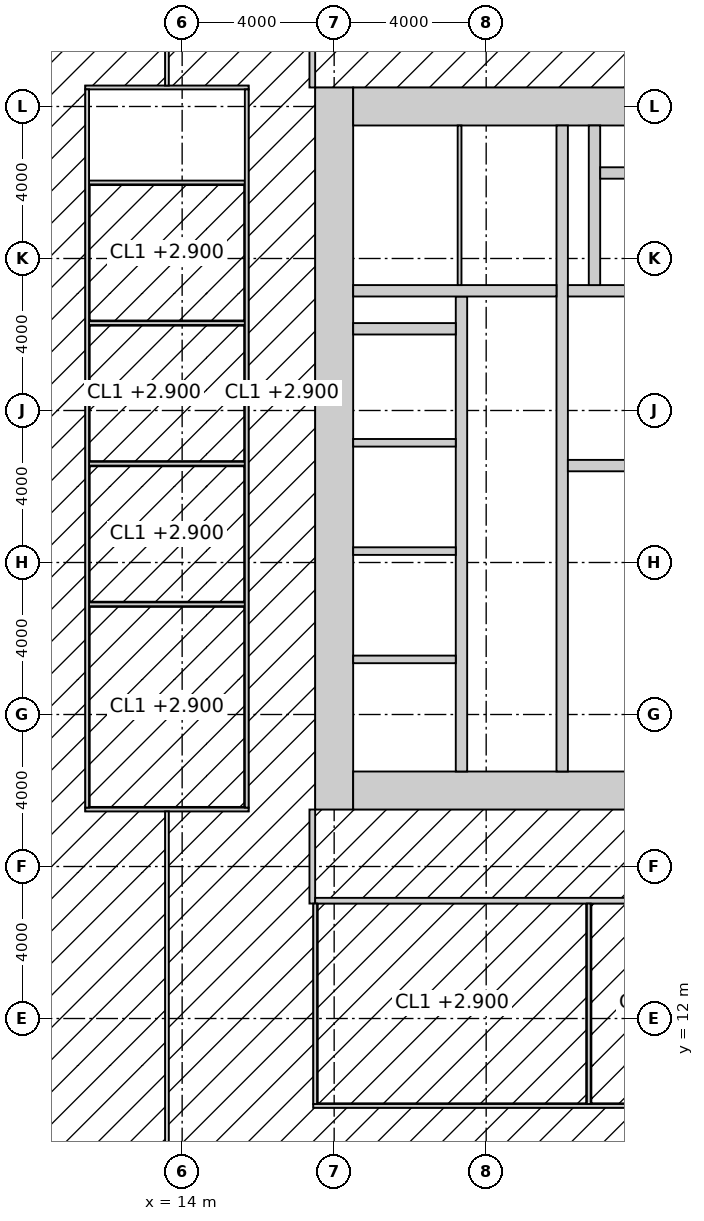
"""IFC4 building model, lengths in metres.
Left out: names, types, materials, properties, quantities, classifications, styles, units other than length and angle.
Written with IfcOpenShell. Run it as: python <this file> out.ifc"""

import sys

from ifc_helpers import new_model, si_unit, direction, frame, frame_2d, origin, place, context, subcontext, project, spatial, rectangle, extrude, element, fill, save


model = new_model("IFC4")
c1 = context("Model", 3, precision=1e-05, world=origin(), true_north=direction((0.0, 1.0)))
c2 = subcontext(c1, "Body", "Model", "MODEL_VIEW")
j1 = project(units=[si_unit("LENGTHUNIT", "METRE"), si_unit("PLANEANGLEUNIT", "RADIAN")], contexts=[c1])
p1 = place(None, origin())
s1 = spatial("IfcSite", under=j1, at=p1, CompositionType="ELEMENT")
p2 = place(p1, origin())
s2 = spatial("IfcBuilding", under=s1, at=p2, CompositionType="ELEMENT")
p3 = place(p2, frame((0.0, 0.0, 159.8)))
s3 = spatial("IfcBuildingStorey", under=s2, at=p3, CompositionType="ELEMENT", Elevation=159.8)
p4 = place(p3, frame((18.0, 17.5, -0.15), z_axis=(0.0, 0.0, 1.0), x_axis=(0.0, 1.0, 0.0)))
e1 = element("IfcWall", 1, at=p4, inside=s3, PredefinedType="SHEAR", context=c2, shape_type="SweptSolid", body=[
    extrude(rectangle(XDim=19.0, YDim=1.0, at=frame_2d((9.5, 0.0))), origin(), (0.0, 0.0, 1.0), 4.0),
])
p5 = place(p3, frame((18.5, 18.0, -0.15), z_axis=(0.0, 0.0, 1.0), x_axis=(1.0, 0.0, 0.0)))
e2 = element("IfcWall", 2, at=p5, inside=s3, PredefinedType="SHEAR", context=c2, shape_type="SweptSolid", body=[
    extrude(rectangle(XDim=17.6, YDim=1.0, at=frame_2d((8.8, 0.0))), origin(), (0.0, 0.0, 1.0), 4.0),
])
p6 = place(p5, frame((3.45, 0.0, 0.15)))
e3 = element("IfcOpeningElement", 3, at=p6, cuts=e2, PredefinedType="OPENING", context=c2, shape_type="SweptSolid", body=[
    extrude(rectangle(XDim=1.5, YDim=2.4, at=frame_2d((0.75, 1.2))), frame((0.0, 0.51, 0.0), z_axis=(0.0, -1.0, 0.0), x_axis=(1.0, 0.0, 0.0)), (0.0, 0.0, 1.0), 1.02),
])
p7 = place(p3, frame((18.5, 36.0, -0.15), z_axis=(0.0, 0.0, 1.0), x_axis=(1.0, 0.0, 0.0)))
e4 = element("IfcWall", 4, at=p7, inside=s3, PredefinedType="SHEAR", context=c2, shape_type="SweptSolid", body=[
    extrude(rectangle(XDim=17.6, YDim=1.0, at=frame_2d((8.8, 0.0))), origin(), (0.0, 0.0, 1.0), 4.0),
])
p8 = place(p3, frame((24.0, 18.5, -0.15), z_axis=(0.0, 0.0, 1.0), x_axis=(0.0, 1.0, 0.0)))
e5 = element("IfcWall", 5, at=p8, inside=s3, PredefinedType="SHEAR", context=c2, shape_type="SweptSolid", body=[
    extrude(rectangle(XDim=17.0, YDim=0.3, at=frame_2d((8.5, 0.0))), origin(), (0.0, 0.0, 1.0), 4.0),
])
p9 = place(p8, frame((9.6, 0.0, 0.15)))
e6 = element("IfcOpeningElement", 6, at=p9, cuts=e5, PredefinedType="OPENING", context=c2, shape_type="SweptSolid", body=[
    extrude(rectangle(XDim=1.5, YDim=2.4, at=frame_2d((0.75, 1.2))), frame((0.0, 0.16, 0.0), z_axis=(0.0, -1.0, 0.0), x_axis=(1.0, 0.0, 0.0)), (0.0, 0.0, 1.0), 0.32),
])
p10 = place(p3, frame((24.15, 26.55, -0.15), z_axis=(0.0, 0.0, 1.0), x_axis=(1.0, 0.0, 0.0)))
e7 = element("IfcWall", 7, at=p10, inside=s3, PredefinedType="SHEAR", context=c2, shape_type="SweptSolid", body=[
    extrude(rectangle(XDim=11.25, YDim=0.3, at=frame_2d((5.625, 0.0))), origin(), (0.0, 0.0, 1.0), 4.0),
])
p11 = place(p10, frame((9.25, 0.0, 0.15)))
e8 = element("IfcOpeningElement", 8, at=p11, cuts=e7, PredefinedType="OPENING", context=c2, shape_type="SweptSolid", body=[
    extrude(rectangle(XDim=1.0, YDim=2.2, at=frame_2d((0.5, 1.1))), frame((0.0, 0.16, 0.0), z_axis=(0.0, -1.0, 0.0), x_axis=(1.0, 0.0, 0.0)), (0.0, 0.0, 1.0), 0.32),
])
p12 = place(p10, frame((4.9, 0.0, 0.15)))
e9 = element("IfcOpeningElement", 9, at=p12, cuts=e7, PredefinedType="OPENING", context=c2, shape_type="SweptSolid", body=[
    extrude(rectangle(XDim=1.5, YDim=2.4, at=frame_2d((0.75, 1.2))), frame((0.0, 0.16, 0.0), z_axis=(0.0, -1.0, 0.0), x_axis=(1.0, 0.0, 0.0)), (0.0, 0.0, 1.0), 0.32),
])
p13 = place(p3, frame((24.15, 31.15, -0.15), z_axis=(0.0, 0.0, 1.0), x_axis=(1.0, 0.0, 0.0)))
e10 = element("IfcWall", 10, at=p13, inside=s3, PredefinedType="SHEAR", context=c2, shape_type="SweptSolid", body=[
    extrude(rectangle(XDim=11.25, YDim=0.3, at=frame_2d((5.625, 0.0))), origin(), (0.0, 0.0, 1.0), 4.0),
])
p14 = place(p13, frame((7.25, 0.0, 0.15)))
e11 = element("IfcOpeningElement", 11, at=p14, cuts=e10, PredefinedType="OPENING", context=c2, shape_type="SweptSolid", body=[
    extrude(rectangle(XDim=1.4, YDim=2.4, at=frame_2d((0.7, 1.2))), frame((0.0, 0.16, 0.0), z_axis=(0.0, -1.0, 0.0), x_axis=(1.0, 0.0, 0.0)), (0.0, 0.0, 1.0), 0.32),
])
p15 = place(p3, frame((21.35, 18.5, -0.15), z_axis=(0.0, 0.0, 1.0), x_axis=(0.0, 1.0, 0.0)))
e12 = element("IfcWall", 12, at=p15, inside=s3, PredefinedType="SHEAR", context=c2, shape_type="SweptSolid", body=[
    extrude(rectangle(XDim=12.5, YDim=0.3, at=frame_2d((6.25, 0.0))), origin(), (0.0, 0.0, 1.0), 4.0),
])
p16 = place(p15, frame((0.875, 0.0, 0.15)))
e13 = element("IfcOpeningElement", 13, at=p16, cuts=e12, PredefinedType="OPENING", context=c2, shape_type="SweptSolid", body=[
    extrude(rectangle(XDim=1.1, YDim=2.2, at=frame_2d((0.55, 1.1))), frame((0.0, 0.16, 0.0), z_axis=(0.0, -1.0, 0.0), x_axis=(1.0, 0.0, 0.0)), (0.0, 0.0, 1.0), 0.32),
])
p17 = place(p15, frame((3.825, 0.0, 0.15)))
e14 = element("IfcOpeningElement", 14, at=p17, cuts=e12, PredefinedType="OPENING", context=c2, shape_type="SweptSolid", body=[
    extrude(rectangle(XDim=1.1, YDim=2.2, at=frame_2d((0.55, 1.1))), frame((0.0, 0.16, 0.0), z_axis=(0.0, -1.0, 0.0), x_axis=(1.0, 0.0, 0.0)), (0.0, 0.0, 1.0), 0.32),
])
p18 = place(p15, frame((6.675, 0.0, 0.15)))
e15 = element("IfcOpeningElement", 15, at=p18, cuts=e12, PredefinedType="OPENING", context=c2, shape_type="SweptSolid", body=[
    extrude(rectangle(XDim=1.1, YDim=2.2, at=frame_2d((0.55, 1.1))), frame((0.0, 0.16, 0.0), z_axis=(0.0, -1.0, 0.0), x_axis=(1.0, 0.0, 0.0)), (0.0, 0.0, 1.0), 0.32),
])
p19 = place(p15, frame((9.575, 0.0, 0.15)))
e16 = element("IfcOpeningElement", 16, at=p19, cuts=e12, PredefinedType="OPENING", context=c2, shape_type="SweptSolid", body=[
    extrude(rectangle(XDim=1.1, YDim=2.2, at=frame_2d((0.55, 1.1))), frame((0.0, 0.16, 0.0), z_axis=(0.0, -1.0, 0.0), x_axis=(1.0, 0.0, 0.0)), (0.0, 0.0, 1.0), 0.32),
])
p20 = place(p3, frame((18.5, 31.15, -0.15), z_axis=(0.0, 0.0, 1.0), x_axis=(1.0, 0.0, 0.0)))
e17 = element("IfcWall", 17, at=p20, inside=s3, PredefinedType="SHEAR", context=c2, shape_type="SweptSolid", body=[
    extrude(rectangle(XDim=5.35, YDim=0.3, at=frame_2d((2.675, 0.0))), origin(), (0.0, 0.0, 1.0), 4.0),
])
p21 = place(p20, frame((3.4, 0.0, 0.15)))
e18 = element("IfcOpeningElement", 18, at=p21, cuts=e17, PredefinedType="OPENING", context=c2, shape_type="SweptSolid", body=[
    extrude(rectangle(XDim=1.0, YDim=2.2, at=frame_2d((0.5, 1.1))), frame((0.0, 0.16, 0.0), z_axis=(0.0, -1.0, 0.0), x_axis=(1.0, 0.0, 0.0)), (0.0, 0.0, 1.0), 0.32),
])
p22 = place(p3, frame((18.5, 30.15, -0.15), z_axis=(0.0, 0.0, 1.0), x_axis=(1.0, 0.0, 0.0)))
e19 = element("IfcWall", 19, at=p22, inside=s3, PredefinedType="SHEAR", context=c2, shape_type="SweptSolid", body=[
    extrude(rectangle(XDim=2.7, YDim=0.3, at=frame_2d((1.35, 0.0))), origin(), (0.0, 0.0, 1.0), 4.0),
])
p23 = place(p3, frame((24.85, 31.3, -0.15), z_axis=(0.0, 0.0, 1.0), x_axis=(0.0, 1.0, 0.0)))
e20 = element("IfcWall", 20, at=p23, inside=s3, PredefinedType="SHEAR", context=c2, shape_type="SweptSolid", body=[
    extrude(rectangle(XDim=4.2, YDim=0.3, at=frame_2d((2.1, 0.0))), origin(), (0.0, 0.0, 1.0), 4.0),
])
p24 = place(p3, frame((25.0, 34.25, -0.15), z_axis=(0.0, 0.0, 1.0), x_axis=(1.0, 0.0, 0.0)))
e21 = element("IfcWall", 21, at=p24, inside=s3, PredefinedType="SHEAR", context=c2, shape_type="SweptSolid", body=[
    extrude(rectangle(XDim=8.6, YDim=0.3, at=frame_2d((4.3, 0.0))), origin(), (0.0, 0.0, 1.0), 4.0),
])
for number, where, z_axis, x_axis in (
    (22, (18.5, 21.45, -0.15), (0.0, 0.0, 1.0), (1.0, 0.0, 0.0)),
    (23, (18.5, 24.3, -0.15), (0.0, 0.0, 1.0), (1.0, 0.0, 0.0)),
    (24, (18.5, 27.15, -0.15), (0.0, 0.0, 1.0), (1.0, 0.0, 0.0)),
):
    element("IfcWall", number, at=place(p3, frame(where, z_axis=z_axis, x_axis=x_axis)), inside=s3, PredefinedType="SOLIDWALL", context=c2, shape_type="SweptSolid", body=[
        extrude(rectangle(XDim=2.7, YDim=0.2, at=frame_2d((1.35, 0.0))), origin(), (0.0, 0.0, 1.0), 4.0),
    ])
p25 = place(p3, frame((21.3, 31.3, 0.0), z_axis=(0.0, 0.0, 1.0), x_axis=(0.0, 1.0, 0.0)))
e25 = element("IfcWall", 25, at=p25, inside=s3, PredefinedType="PARTITIONING", context=c2, shape_type="SweptSolid", body=[
    extrude(rectangle(XDim=4.2, YDim=0.1, at=frame_2d((2.1, 0.0))), origin(), (0.0, 0.0, 1.0), 3.85),
])
p26 = place(p25, frame((1.55, 0.0, 0.0)))
e26 = element("IfcOpeningElement", 26, at=p26, cuts=e25, PredefinedType="OPENING", context=c2, shape_type="SweptSolid", body=[
    extrude(rectangle(XDim=1.0, YDim=2.2, at=frame_2d((0.5, 1.1))), frame((0.0, 0.06, 0.0), z_axis=(0.0, -1.0, 0.0), x_axis=(1.0, 0.0, 0.0)), (0.0, 0.0, 1.0), 0.12),
])
p27 = place(p3, frame((17.425, 15.025, 0.0), z_axis=(0.0, 0.0, 1.0), x_axis=(0.0, 1.0, 0.0)))
e27 = element("IfcWall", 27, at=p27, inside=s3, PredefinedType="PARTITIONING", context=c2, shape_type="SweptSolid", body=[
    extrude(rectangle(XDim=2.475, YDim=0.15, at=frame_2d((1.238, 0.0))), origin(), (0.0, 0.0, 1.0), 3.85),
])
p28 = place(p3, frame((17.425, 36.5, 0.0), z_axis=(0.0, 0.0, 1.0), x_axis=(0.0, 1.0, 0.0)))
e28 = element("IfcWall", 28, at=p28, inside=s3, PredefinedType="PARTITIONING", context=c2, shape_type="SweptSolid", body=[
    extrude(rectangle(XDim=1.875, YDim=0.15, at=frame_2d((0.938, 0.0))), origin(), (0.0, 0.0, 1.0), 3.85),
])
p29 = place(p3, frame((17.5, 15.1, 0.0), z_axis=(0.0, 0.0, 1.0), x_axis=(1.0, 0.0, 0.0)))
e29 = element("IfcWall", 29, at=p29, inside=s3, PredefinedType="PARTITIONING", context=c2, shape_type="SweptSolid", body=[
    extrude(rectangle(XDim=20.325, YDim=0.15, at=frame_2d((10.163, 0.0))), origin(), (0.0, 0.0, 1.0), 3.85),
])
p30 = place(p3, frame((17.45, 9.7, 0.0), z_axis=(0.0, 0.0, 1.0), x_axis=(1.0, 0.0, 0.0)))
e30 = element("IfcWall", 30, at=p30, inside=s3, PredefinedType="PARTITIONING", context=c2, shape_type="SweptSolid", body=[
    extrude(rectangle(XDim=17.65, YDim=0.1, at=frame_2d((8.825, 0.0))), origin(), (0.0, 0.0, 1.0), 3.85),
])
p31 = place(p30, frame((2.75, 0.0, 0.0)))
e31 = element("IfcOpeningElement", 31, at=p31, cuts=e30, PredefinedType="OPENING", context=c2, shape_type="SweptSolid", body=[
    extrude(rectangle(XDim=1.8, YDim=2.4, at=frame_2d((0.9, 1.2))), frame((0.0, 0.06, 0.0), z_axis=(0.0, -1.0, 0.0), x_axis=(1.0, 0.0, 0.0)), (0.0, 0.0, 1.0), 0.12),
])
p32 = place(p30, frame((9.05, 0.0, 0.0)))
e32 = element("IfcOpeningElement", 32, at=p32, cuts=e30, PredefinedType="OPENING", context=c2, shape_type="SweptSolid", body=[
    extrude(rectangle(XDim=1.0, YDim=2.2, at=frame_2d((0.5, 1.1))), frame((0.0, 0.06, 0.0), z_axis=(0.0, -1.0, 0.0), x_axis=(1.0, 0.0, 0.0)), (0.0, 0.0, 1.0), 0.12),
])
p33 = place(p30, frame((12.675, 0.0, 0.0)))
e33 = element("IfcOpeningElement", 33, at=p33, cuts=e30, PredefinedType="OPENING", context=c2, shape_type="SweptSolid", body=[
    extrude(rectangle(XDim=1.0, YDim=2.2, at=frame_2d((0.5, 1.1))), frame((0.0, 0.06, 0.0), z_axis=(0.0, -1.0, 0.0), x_axis=(1.0, 0.0, 0.0)), (0.0, 0.0, 1.0), 0.12),
])
p34 = place(p30, frame((15.55, 0.0, 0.0)))
e34 = element("IfcOpeningElement", 34, at=p34, cuts=e30, PredefinedType="OPENING", context=c2, shape_type="SweptSolid", body=[
    extrude(rectangle(XDim=1.0, YDim=2.2, at=frame_2d((0.5, 1.1))), frame((0.0, 0.06, 0.0), z_axis=(0.0, -1.0, 0.0), x_axis=(1.0, 0.0, 0.0)), (0.0, 0.0, 1.0), 0.12),
])
p35 = place(p3, frame((11.45, 17.5, 0.0), z_axis=(0.0, 0.0, 1.0), x_axis=(1.0, 0.0, 0.0)))
e35 = element("IfcWall", 35, at=p35, inside=s3, PredefinedType="PARTITIONING", context=c2, shape_type="SweptSolid", body=[
    extrude(rectangle(XDim=4.3, YDim=0.1, at=frame_2d((2.15, 0.0))), origin(), (0.0, 0.0, 1.0), 3.85),
])
for number, where, z_axis, x_axis in (
    (36, (11.55, 22.9, 0.0), (0.0, 0.0, 1.0), (1.0, 0.0, 0.0)),
    (37, (11.55, 26.6, 0.0), (0.0, 0.0, 1.0), (1.0, 0.0, 0.0)),
    (38, (11.55, 30.3, 0.0), (0.0, 0.0, 1.0), (1.0, 0.0, 0.0)),
    (39, (11.55, 34.0, 0.0), (0.0, 0.0, 1.0), (1.0, 0.0, 0.0)),
):
    element("IfcWall", number, at=place(p3, frame(where, z_axis=z_axis, x_axis=x_axis)), inside=s3, PredefinedType="PARTITIONING", context=c2, shape_type="SweptSolid", body=[
        extrude(rectangle(XDim=4.1, YDim=0.1, at=frame_2d((2.05, 0.0))), origin(), (0.0, 0.0, 1.0), 3.85),
    ])
p36 = place(p3, frame((11.45, 36.5, 0.0), z_axis=(0.0, 0.0, 1.0), x_axis=(1.0, 0.0, 0.0)))
e40 = element("IfcWall", 40, at=p36, inside=s3, PredefinedType="PARTITIONING", context=c2, shape_type="SweptSolid", body=[
    extrude(rectangle(XDim=4.3, YDim=0.1, at=frame_2d((2.15, 0.0))), origin(), (0.0, 0.0, 1.0), 2.85),
])
p37 = place(p3, frame((11.5, 17.55, 0.0), z_axis=(0.0, 0.0, 1.0), x_axis=(0.0, 1.0, 0.0)))
e41 = element("IfcWall", 41, at=p37, inside=s3, PredefinedType="PARTITIONING", context=c2, shape_type="SweptSolid", body=[
    extrude(rectangle(XDim=18.9, YDim=0.1, at=frame_2d((9.45, 0.0))), origin(), (0.0, 0.0, 1.0), 3.85),
])
p38 = place(p37, frame((2.15, 0.0, 0.0)))
e42 = element("IfcOpeningElement", 42, at=p38, cuts=e41, PredefinedType="OPENING", context=c2, shape_type="SweptSolid", body=[
    extrude(rectangle(XDim=1.0, YDim=2.2, at=frame_2d((0.5, 1.1))), frame((0.0, 0.06, 0.0), z_axis=(0.0, -1.0, 0.0), x_axis=(1.0, 0.0, 0.0)), (0.0, 0.0, 1.0), 0.12),
])
p39 = place(p37, frame((7.05, 0.0, 0.0)))
e43 = element("IfcOpeningElement", 43, at=p39, cuts=e41, PredefinedType="OPENING", context=c2, shape_type="SweptSolid", body=[
    extrude(rectangle(XDim=1.0, YDim=2.2, at=frame_2d((0.5, 1.1))), frame((0.0, 0.06, 0.0), z_axis=(0.0, -1.0, 0.0), x_axis=(1.0, 0.0, 0.0)), (0.0, 0.0, 1.0), 0.12),
])
p40 = place(p37, frame((10.4, 0.0, 0.0)))
e44 = element("IfcOpeningElement", 44, at=p40, cuts=e41, PredefinedType="OPENING", context=c2, shape_type="SweptSolid", body=[
    extrude(rectangle(XDim=1.0, YDim=2.2, at=frame_2d((0.5, 1.1))), frame((0.0, 0.06, 0.0), z_axis=(0.0, -1.0, 0.0), x_axis=(1.0, 0.0, 0.0)), (0.0, 0.0, 1.0), 0.12),
])
p41 = place(p37, frame((15.05, 0.0, 0.0)))
e45 = element("IfcOpeningElement", 45, at=p41, cuts=e41, PredefinedType="OPENING", context=c2, shape_type="SweptSolid", body=[
    extrude(rectangle(XDim=1.0, YDim=2.2, at=frame_2d((0.5, 1.1))), frame((0.0, 0.06, 0.0), z_axis=(0.0, -1.0, 0.0), x_axis=(1.0, 0.0, 0.0)), (0.0, 0.0, 1.0), 0.12),
])
p42 = place(p37, frame((17.2, 0.0, 0.0)))
e46 = element("IfcOpeningElement", 46, at=p42, cuts=e41, PredefinedType="OPENING", context=c2, shape_type="SweptSolid", body=[
    extrude(rectangle(XDim=1.0, YDim=2.2, at=frame_2d((0.5, 1.1))), frame((0.0, 0.06, 0.0), z_axis=(0.0, -1.0, 0.0), x_axis=(1.0, 0.0, 0.0)), (0.0, 0.0, 1.0), 0.12),
])
p43 = place(p3, frame((15.7, 17.55, 0.0), z_axis=(0.0, 0.0, 1.0), x_axis=(0.0, 1.0, 0.0)))
e47 = element("IfcWall", 47, at=p43, inside=s3, PredefinedType="PARTITIONING", context=c2, shape_type="SweptSolid", body=[
    extrude(rectangle(XDim=18.9, YDim=0.1, at=frame_2d((9.45, 0.0))), origin(), (0.0, 0.0, 1.0), 3.85),
])
for number, where, z_axis, x_axis in (
    (48, (17.5, 9.75, 0.0), (0.0, 0.0, 1.0), (0.0, 1.0, 0.0)),
    (49, (24.7, 9.75, 0.0), (0.0, 0.0, 1.0), (0.0, 1.0, 0.0)),
):
    element("IfcWall", number, at=place(p3, frame(where, z_axis=z_axis, x_axis=x_axis)), inside=s3, PredefinedType="PARTITIONING", context=c2, shape_type="SweptSolid", body=[
        extrude(rectangle(XDim=5.275, YDim=0.1, at=frame_2d((2.637, 0.0))), origin(), (0.0, 0.0, 1.0), 3.85),
    ])
p44 = place(p3, frame((13.6, 4.3, 0.0), z_axis=(0.0, 0.0, 1.0), x_axis=(0.0, 1.0, 0.0)))
e50 = element("IfcWall", 50, at=p44, inside=s3, PredefinedType="PARTITIONING", context=c2, shape_type="SweptSolid", body=[
    extrude(rectangle(XDim=13.15, YDim=0.1, at=frame_2d((6.575, 0.0))), origin(), (0.0, 0.0, 1.0), 3.85),
])
p45 = place(p3, frame((13.6, 36.55, 0.0), z_axis=(0.0, 0.0, 1.0), x_axis=(0.0, 1.0, 0.0)))
e51 = element("IfcWall", 51, at=p45, inside=s3, PredefinedType="PARTITIONING", context=c2, shape_type="SweptSolid", body=[
    extrude(rectangle(XDim=15.15, YDim=0.1, at=frame_2d((7.575, 0.0))), origin(), (0.0, 0.0, 1.0), 3.85),
])
p46 = place(p45, frame((7.075, 0.0, 0.0)))
e52 = element("IfcOpeningElement", 52, at=p46, cuts=e51, PredefinedType="OPENING", context=c2, shape_type="SweptSolid", body=[
    extrude(rectangle(XDim=1.0, YDim=2.2, at=frame_2d((0.5, 1.1))), frame((0.0, 0.06, 0.0), z_axis=(0.0, -1.0, 0.0), x_axis=(1.0, 0.0, 0.0)), (0.0, 0.0, 1.0), 0.12),
])
p47 = place(p9, origin())
e53 = element("IfcDoor", 53, at=p47, inside=s3, OperationType="DOUBLE_DOOR_DOUBLE_SWING", PredefinedType="DOOR", context=c2, shape_type="SweptSolid", body=[
    extrude(rectangle(XDim=1.5, YDim=2.4, at=frame_2d((0.75, 1.2))), frame((0.0, 0.025, 0.0), z_axis=(0.0, -1.0, 0.0), x_axis=(1.0, 0.0, 0.0)), (0.0, 0.0, 1.0), 0.05),
])
fill(e6, e53)
p48 = place(p21, origin())
e54 = element("IfcDoor", 54, at=p48, inside=s3, OperationType="SINGLE_SWING_LEFT", PredefinedType="DOOR", context=c2, shape_type="SweptSolid", body=[
    extrude(rectangle(XDim=1.0, YDim=2.2, at=frame_2d((0.5, 1.1))), frame((0.0, 0.025, 0.0), z_axis=(0.0, -1.0, 0.0), x_axis=(1.0, 0.0, 0.0)), (0.0, 0.0, 1.0), 0.05),
])
fill(e18, e54)
p49 = place(p26, origin())
e55 = element("IfcDoor", 55, at=p49, inside=s3, OperationType="SINGLE_SWING_LEFT", PredefinedType="DOOR", context=c2, shape_type="SweptSolid", body=[
    extrude(rectangle(XDim=1.0, YDim=2.2, at=frame_2d((0.5, 1.1))), frame((0.0, 0.025, 0.0), z_axis=(0.0, -1.0, 0.0), x_axis=(1.0, 0.0, 0.0)), (0.0, 0.0, 1.0), 0.05),
])
fill(e26, e55)
p50 = place(p6, origin())
e56 = element("IfcDoor", 56, at=p50, inside=s3, OperationType="DOUBLE_DOOR_DOUBLE_SWING", PredefinedType="DOOR", context=c2, shape_type="SweptSolid", body=[
    extrude(rectangle(XDim=1.5, YDim=2.4, at=frame_2d((0.75, 1.2))), frame((0.0, 0.025, 0.0), z_axis=(0.0, -1.0, 0.0), x_axis=(1.0, 0.0, 0.0)), (0.0, 0.0, 1.0), 0.05),
])
fill(e3, e56)
p51 = place(p31, origin())
e57 = element("IfcDoor", 57, at=p51, inside=s3, OperationType="DOUBLE_DOOR_DOUBLE_SWING", PredefinedType="DOOR", context=c2, shape_type="SweptSolid", body=[
    extrude(rectangle(XDim=1.8, YDim=2.4, at=frame_2d((0.9, 1.2))), frame((0.0, 0.025, 0.0), z_axis=(0.0, -1.0, 0.0), x_axis=(1.0, 0.0, 0.0)), (0.0, 0.0, 1.0), 0.05),
])
fill(e31, e57)
p52 = place(p38, origin())
e58 = element("IfcDoor", 58, at=p52, inside=s3, OperationType="SINGLE_SWING_RIGHT", PredefinedType="DOOR", context=c2, shape_type="SweptSolid", body=[
    extrude(rectangle(XDim=1.0, YDim=2.2, at=frame_2d((0.5, 1.1))), frame((0.0, 0.025, 0.0), z_axis=(0.0, -1.0, 0.0), x_axis=(1.0, 0.0, 0.0)), (0.0, 0.0, 1.0), 0.05),
])
fill(e42, e58)
p53 = place(p39, origin())
e59 = element("IfcDoor", 59, at=p53, inside=s3, OperationType="SINGLE_SWING_RIGHT", PredefinedType="DOOR", context=c2, shape_type="SweptSolid", body=[
    extrude(rectangle(XDim=1.0, YDim=2.2, at=frame_2d((0.5, 1.1))), frame((0.0, 0.025, 0.0), z_axis=(0.0, -1.0, 0.0), x_axis=(1.0, 0.0, 0.0)), (0.0, 0.0, 1.0), 0.05),
])
fill(e43, e59)
p54 = place(p40, origin())
e60 = element("IfcDoor", 60, at=p54, inside=s3, OperationType="SINGLE_SWING_RIGHT", PredefinedType="DOOR", context=c2, shape_type="SweptSolid", body=[
    extrude(rectangle(XDim=1.0, YDim=2.2, at=frame_2d((0.5, 1.1))), frame((0.0, 0.025, 0.0), z_axis=(0.0, -1.0, 0.0), x_axis=(1.0, 0.0, 0.0)), (0.0, 0.0, 1.0), 0.05),
])
fill(e44, e60)
p55 = place(p41, origin())
e61 = element("IfcDoor", 61, at=p55, inside=s3, OperationType="SINGLE_SWING_RIGHT", PredefinedType="DOOR", context=c2, shape_type="SweptSolid", body=[
    extrude(rectangle(XDim=1.0, YDim=2.2, at=frame_2d((0.5, 1.1))), frame((0.0, 0.025, 0.0), z_axis=(0.0, -1.0, 0.0), x_axis=(1.0, 0.0, 0.0)), (0.0, 0.0, 1.0), 0.05),
])
fill(e45, e61)
p56 = place(p42, origin())
e62 = element("IfcDoor", 62, at=p56, inside=s3, OperationType="SINGLE_SWING_LEFT", PredefinedType="DOOR", context=c2, shape_type="SweptSolid", body=[
    extrude(rectangle(XDim=1.0, YDim=2.2, at=frame_2d((0.5, 1.1))), frame((0.0, 0.025, 0.0), z_axis=(0.0, -1.0, 0.0), x_axis=(1.0, 0.0, 0.0)), (0.0, 0.0, 1.0), 0.05),
])
fill(e46, e62)
p57 = place(p16, origin())
e63 = element("IfcDoor", 63, at=p57, inside=s3, OperationType="DOUBLE_DOOR_SLIDING", PredefinedType="DOOR", context=c2, shape_type="SweptSolid", body=[
    extrude(rectangle(XDim=1.1, YDim=2.2, at=frame_2d((0.55, 1.1))), frame((0.0, 0.025, 0.0), z_axis=(0.0, -1.0, 0.0), x_axis=(1.0, 0.0, 0.0)), (0.0, 0.0, 1.0), 0.05),
])
fill(e13, e63)
p58 = place(p17, origin())
e64 = element("IfcDoor", 64, at=p58, inside=s3, OperationType="DOUBLE_DOOR_SLIDING", PredefinedType="DOOR", context=c2, shape_type="SweptSolid", body=[
    extrude(rectangle(XDim=1.1, YDim=2.2, at=frame_2d((0.55, 1.1))), frame((0.0, 0.025, 0.0), z_axis=(0.0, -1.0, 0.0), x_axis=(1.0, 0.0, 0.0)), (0.0, 0.0, 1.0), 0.05),
])
fill(e14, e64)
p59 = place(p18, origin())
e65 = element("IfcDoor", 65, at=p59, inside=s3, OperationType="DOUBLE_DOOR_SLIDING", PredefinedType="DOOR", context=c2, shape_type="SweptSolid", body=[
    extrude(rectangle(XDim=1.1, YDim=2.2, at=frame_2d((0.55, 1.1))), frame((0.0, 0.025, 0.0), z_axis=(0.0, -1.0, 0.0), x_axis=(1.0, 0.0, 0.0)), (0.0, 0.0, 1.0), 0.05),
])
fill(e15, e65)
p60 = place(p19, origin())
e66 = element("IfcDoor", 66, at=p60, inside=s3, OperationType="DOUBLE_DOOR_SLIDING", PredefinedType="DOOR", context=c2, shape_type="SweptSolid", body=[
    extrude(rectangle(XDim=1.1, YDim=2.2, at=frame_2d((0.55, 1.1))), frame((0.0, 0.025, 0.0), z_axis=(0.0, -1.0, 0.0), x_axis=(1.0, 0.0, 0.0)), (0.0, 0.0, 1.0), 0.05),
])
fill(e16, e66)
save(model, sys.argv[1])
